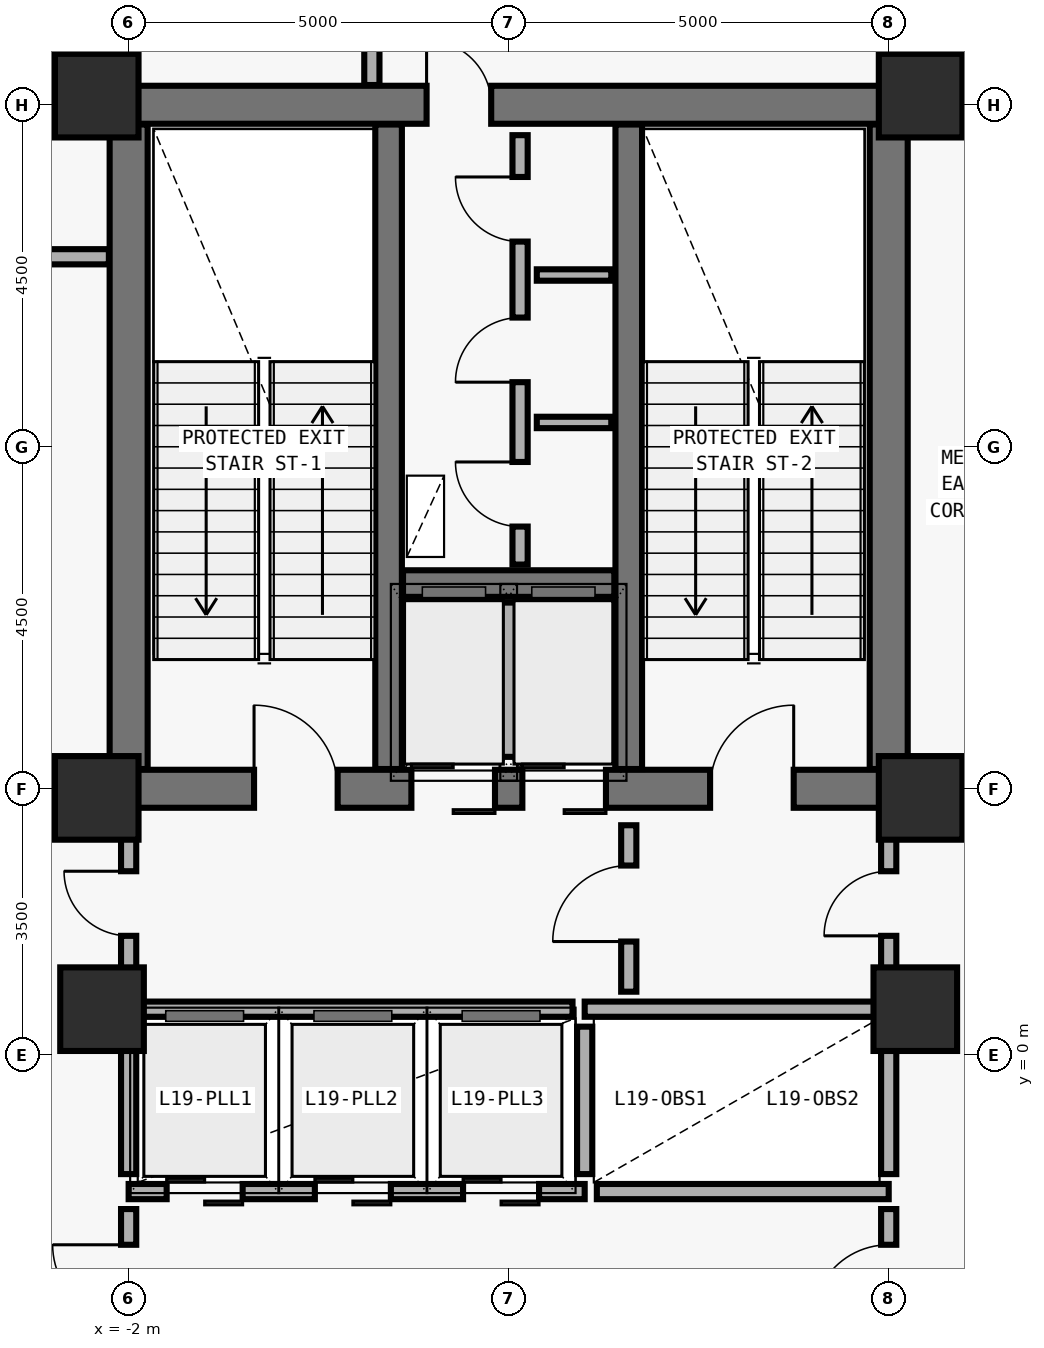
"""IFC4 building model, lengths in metres.
Left out: names, types, materials, properties, quantities, classifications, styles, units other than length and angle.
Written with IfcOpenShell. Run it as: python <this file> out.ifc"""

import sys

from ifc_helpers import new_model, si_unit, direction, frame, frame_2d, origin, origin_2d, place, context, subcontext, project, spatial, rectangle, extrude, element, fill, save


model = new_model("IFC4")
c1 = context("Model", 3, precision=1e-05, world=origin(), true_north=direction((0.0, 1.0)))
c2 = subcontext(c1, "Body", "Model", "MODEL_VIEW")
j1 = project(units=[si_unit("LENGTHUNIT", "METRE"), si_unit("PLANEANGLEUNIT", "RADIAN")], contexts=[c1])
p1 = place(None, origin())
s1 = spatial("IfcSite", under=j1, at=p1, CompositionType="ELEMENT")
p2 = place(p1, origin())
s2 = spatial("IfcBuilding", under=s1, at=p2, CompositionType="ELEMENT")
p3 = place(p2, frame((0.0, 0.0, 78.3)))
s3 = spatial("IfcBuildingStorey", under=s2, at=p3, CompositionType="ELEMENT", Elevation=78.3)
p4 = place(p3, frame((-2.0, 3.5, 0.0), z_axis=(0.0, 0.0, 1.0), x_axis=(1.0, 0.0, 0.0)))
e1 = element("IfcWall", 1, at=p4, inside=s3, PredefinedType="SHEAR", context=c2, shape_type="SweptSolid", body=[
    extrude(rectangle(XDim=10.0, YDim=0.5, at=frame_2d((5.0, 0.0))), origin(), (0.0, 0.0, 1.0), 5.392),
])
p5 = place(p4, frame((1.65, 0.0, 0.0)))
e2 = element("IfcOpeningElement", 2, at=p5, cuts=e1, PredefinedType="OPENING", context=c2, shape_type="SweptSolid", body=[
    extrude(rectangle(XDim=1.1, YDim=2.15, at=frame_2d((0.55, 1.075))), frame((0.0, 0.26, 0.0), z_axis=(0.0, -1.0, 0.0), x_axis=(1.0, 0.0, 0.0)), (0.0, 0.0, 1.0), 0.52),
])
p6 = place(p4, frame((7.65, 0.0, 0.0)))
e3 = element("IfcOpeningElement", 3, at=p6, cuts=e1, PredefinedType="OPENING", context=c2, shape_type="SweptSolid", body=[
    extrude(rectangle(XDim=1.1, YDim=2.15, at=frame_2d((0.55, 1.075))), frame((0.0, 0.26, 0.0), z_axis=(0.0, -1.0, 0.0), x_axis=(1.0, 0.0, 0.0)), (0.0, 0.0, 1.0), 0.52),
])
p7 = place(p4, frame((3.72, 0.0, 0.0)))
e4 = element("IfcOpeningElement", 4, at=p7, cuts=e1, PredefinedType="OPENING", context=c2, shape_type="SweptSolid", body=[
    extrude(rectangle(XDim=1.1, YDim=2.2, at=frame_2d((0.55, 1.1))), frame((0.0, 0.26, 0.0), z_axis=(0.0, -1.0, 0.0), x_axis=(1.0, 0.0, 0.0)), (0.0, 0.0, 1.0), 0.52),
])
p8 = place(p4, frame((5.18, 0.0, 0.0)))
e5 = element("IfcOpeningElement", 5, at=p8, cuts=e1, PredefinedType="OPENING", context=c2, shape_type="SweptSolid", body=[
    extrude(rectangle(XDim=1.1, YDim=2.2, at=frame_2d((0.55, 1.1))), frame((0.0, 0.26, 0.0), z_axis=(0.0, -1.0, 0.0), x_axis=(1.0, 0.0, 0.0)), (0.0, 0.0, 1.0), 0.52),
])
p9 = place(p3, frame((-2.0, 12.5, 0.0), z_axis=(0.0, 0.0, 1.0), x_axis=(1.0, 0.0, 0.0)))
e6 = element("IfcWall", 6, at=p9, inside=s3, PredefinedType="SHEAR", context=c2, shape_type="SweptSolid", body=[
    extrude(rectangle(XDim=10.0, YDim=0.5, at=frame_2d((5.0, 0.0))), origin(), (0.0, 0.0, 1.0), 5.392),
])
p10 = place(p9, frame((3.92, 0.0, 0.0)))
e7 = element("IfcOpeningElement", 7, at=p10, cuts=e6, PredefinedType="OPENING", context=c2, shape_type="SweptSolid", body=[
    extrude(rectangle(XDim=0.85, YDim=2.1, at=frame_2d((0.425, 1.05))), frame((0.0, 0.26, 0.0), z_axis=(0.0, -1.0, 0.0), x_axis=(1.0, 0.0, 0.0)), (0.0, 0.0, 1.0), 0.52),
])
for number, where, z_axis, x_axis in (
    (8, (-2.0, 3.76, 0.0), (0.0, 0.0, 1.0), (0.0, 1.0, 0.0)),
    (9, (8.0, 3.76, 0.0), (0.0, 0.0, 1.0), (0.0, 1.0, 0.0)),
):
    element("IfcWall", number, at=place(p3, frame(where, z_axis=z_axis, x_axis=x_axis)), inside=s3, PredefinedType="SHEAR", context=c2, shape_type="SweptSolid", body=[
        extrude(rectangle(XDim=8.48, YDim=0.5, at=frame_2d((4.24, 0.0))), origin(), (0.0, 0.0, 1.0), 5.392),
    ])
for number, where, z_axis, x_axis in (
    (10, (1.42, 3.76, 0.0), (0.0, 0.0, 1.0), (0.0, 1.0, 0.0)),
    (11, (4.58, 3.76, 0.0), (0.0, 0.0, 1.0), (0.0, 1.0, 0.0)),
):
    element("IfcWall", number, at=place(p3, frame(where, z_axis=z_axis, x_axis=x_axis)), inside=s3, PredefinedType="SHEAR", context=c2, shape_type="SweptSolid", body=[
        extrude(rectangle(XDim=8.48, YDim=0.35, at=frame_2d((4.24, 0.0))), origin(), (0.0, 0.0, 1.0), 5.392),
    ])
p11 = place(p3, frame((1.61, 6.2, 0.0), z_axis=(0.0, 0.0, 1.0), x_axis=(1.0, 0.0, 0.0)))
e12 = element("IfcWall", 12, at=p11, inside=s3, PredefinedType="SHEAR", context=c2, shape_type="SweptSolid", body=[
    extrude(rectangle(XDim=2.78, YDim=0.35, at=frame_2d((1.39, 0.0))), origin(), (0.0, 0.0, 1.0), 5.392),
])
for number, where, z_axis, x_axis in (
    (13, (-2.42, 12.62, 0.0), (0.0, 0.0, 1.0), (1.0, 0.0, 0.0)),
    (14, (8.42, 12.62, 0.0), (0.0, 0.0, 1.0), (1.0, 0.0, 0.0)),
    (15, (-2.42, 3.38, 0.0), (0.0, 0.0, 1.0), (1.0, 0.0, 0.0)),
    (16, (8.42, 3.38, 0.0), (0.0, 0.0, 1.0), (1.0, 0.0, 0.0)),
    (17, (-2.35, 0.6, 0.0), (0.0, 0.0, 1.0), (1.0, 0.0, 0.0)),
    (18, (8.35, 0.6, 0.0), (0.0, 0.0, 1.0), (1.0, 0.0, 0.0)),
):
    element("IfcColumn", number, at=place(p3, frame(where, z_axis=z_axis, x_axis=x_axis)), inside=s3, PredefinedType="COLUMN", context=c2, shape_type="SweptSolid", body=[
        extrude(rectangle(XDim=1.1, YDim=1.1, at=origin_2d()), origin(), (0.0, 0.0, 1.0), 5.375),
    ])
p12 = place(p3, frame((3.0, 3.92, 0.0), z_axis=(0.0, 0.0, 1.0), x_axis=(0.0, 1.0, 0.0)))
e19 = element("IfcWall", 19, at=p12, inside=s3, PredefinedType="SOLIDWALL", context=c2, shape_type="SweptSolid", body=[
    extrude(rectangle(XDim=2.03, YDim=0.2, at=frame_2d((1.015, 0.0))), origin(), (0.0, 0.0, 1.0), 5.14),
])
p13 = place(p3, frame((4.0, 0.6, 0.0), z_axis=(0.0, 0.0, 1.0), x_axis=(1.0, 0.0, 0.0)))
e20 = element("IfcWall", 20, at=p13, inside=s3, PredefinedType="SOLIDWALL", context=c2, shape_type="SweptSolid", body=[
    extrude(rectangle(XDim=3.88, YDim=0.2, at=frame_2d((1.94, 0.0))), origin(), (0.0, 0.0, 1.0), 4.672),
])
p14 = place(p3, frame((-2.0, -1.8, 0.0), z_axis=(0.0, 0.0, 1.0), x_axis=(1.0, 0.0, 0.0)))
e21 = element("IfcWall", 21, at=p14, inside=s3, PredefinedType="SOLIDWALL", context=c2, shape_type="SweptSolid", body=[
    extrude(rectangle(XDim=6.0, YDim=0.2, at=frame_2d((3.0, 0.0))), origin(), (0.0, 0.0, 1.0), 5.14),
])
p15 = place(p14, frame((0.5, 0.0, 0.0)))
e22 = element("IfcOpeningElement", 22, at=p15, cuts=e21, PredefinedType="OPENING", context=c2, shape_type="SweptSolid", body=[
    extrude(rectangle(XDim=1.0, YDim=2.2, at=frame_2d((0.5, 1.1))), frame((0.0, 0.11, 0.0), z_axis=(0.0, -1.0, 0.0), x_axis=(1.0, 0.0, 0.0)), (0.0, 0.0, 1.0), 0.22),
])
p16 = place(p14, frame((2.45, 0.0, 0.0)))
e23 = element("IfcOpeningElement", 23, at=p16, cuts=e21, PredefinedType="OPENING", context=c2, shape_type="SweptSolid", body=[
    extrude(rectangle(XDim=1.0, YDim=2.2, at=frame_2d((0.5, 1.1))), frame((0.0, 0.11, 0.0), z_axis=(0.0, -1.0, 0.0), x_axis=(1.0, 0.0, 0.0)), (0.0, 0.0, 1.0), 0.22),
])
p17 = place(p14, frame((4.4, 0.0, 0.0)))
e24 = element("IfcOpeningElement", 24, at=p17, cuts=e21, PredefinedType="OPENING", context=c2, shape_type="SweptSolid", body=[
    extrude(rectangle(XDim=1.0, YDim=2.2, at=frame_2d((0.5, 1.1))), frame((0.0, 0.11, 0.0), z_axis=(0.0, -1.0, 0.0), x_axis=(1.0, 0.0, 0.0)), (0.0, 0.0, 1.0), 0.22),
])
p18 = place(p3, frame((-2.0, -1.57, 0.0), z_axis=(0.0, 0.0, 1.0), x_axis=(0.0, 1.0, 0.0)))
e25 = element("IfcWall", 25, at=p18, inside=s3, PredefinedType="SOLIDWALL", context=c2, shape_type="SweptSolid", body=[
    extrude(rectangle(XDim=2.05, YDim=0.2, at=frame_2d((1.025, 0.0))), origin(), (0.0, 0.0, 1.0), 4.522),
])
p19 = place(p3, frame((4.16, -1.8, 0.0), z_axis=(0.0, 0.0, 1.0), x_axis=(1.0, 0.0, 0.0)))
e26 = element("IfcWall", 26, at=p19, inside=s3, PredefinedType="SOLIDWALL", context=c2, shape_type="SweptSolid", body=[
    extrude(rectangle(XDim=3.84, YDim=0.2, at=frame_2d((1.92, 0.0))), origin(), (0.0, 0.0, 1.0), 5.14),
])
p20 = place(p3, frame((4.0, -1.57, 0.0), z_axis=(0.0, 0.0, 1.0), x_axis=(0.0, 1.0, 0.0)))
e27 = element("IfcWall", 27, at=p20, inside=s3, PredefinedType="SOLIDWALL", context=c2, shape_type="SweptSolid", body=[
    extrude(rectangle(XDim=1.94, YDim=0.2, at=frame_2d((0.97, 0.0))), origin(), (0.0, 0.0, 1.0), 5.14),
])
p21 = place(p3, frame((8.0, -1.57, 0.0), z_axis=(0.0, 0.0, 1.0), x_axis=(0.0, 1.0, 0.0)))
e28 = element("IfcWall", 28, at=p21, inside=s3, PredefinedType="SOLIDWALL", context=c2, shape_type="SweptSolid", body=[
    extrude(rectangle(XDim=2.05, YDim=0.2, at=frame_2d((1.025, 0.0))), origin(), (0.0, 0.0, 1.0), 4.572),
])
p22 = place(p3, frame((3.15, 6.45, 0.0), z_axis=(0.0, 0.0, 1.0), x_axis=(0.0, 1.0, 0.0)))
e29 = element("IfcWall", 29, at=p22, inside=s3, PredefinedType="MOVABLE", context=c2, shape_type="SweptSolid", body=[
    extrude(rectangle(XDim=5.65, YDim=0.2, at=frame_2d((2.825, 0.0))), origin(), (0.0, 0.0, 1.0), 5.14),
])
p23 = place(p22, frame((0.5, 0.0, 0.0)))
e30 = element("IfcOpeningElement", 30, at=p23, cuts=e29, PredefinedType="OPENING", context=c2, shape_type="SweptSolid", body=[
    extrude(rectangle(XDim=0.85, YDim=2.1, at=frame_2d((0.425, 1.05))), frame((0.0, 0.11, 0.0), z_axis=(0.0, -1.0, 0.0), x_axis=(1.0, 0.0, 0.0)), (0.0, 0.0, 1.0), 0.22),
])
p24 = place(p22, frame((2.4, 0.0, 0.0)))
e31 = element("IfcOpeningElement", 31, at=p24, cuts=e29, PredefinedType="OPENING", context=c2, shape_type="SweptSolid", body=[
    extrude(rectangle(XDim=0.85, YDim=2.1, at=frame_2d((0.425, 1.05))), frame((0.0, 0.11, 0.0), z_axis=(0.0, -1.0, 0.0), x_axis=(1.0, 0.0, 0.0)), (0.0, 0.0, 1.0), 0.22),
])
p25 = place(p22, frame((4.25, 0.0, 0.0)))
e32 = element("IfcOpeningElement", 32, at=p25, cuts=e29, PredefinedType="OPENING", context=c2, shape_type="SweptSolid", body=[
    extrude(rectangle(XDim=0.85, YDim=2.1, at=frame_2d((0.425, 1.05))), frame((0.0, 0.11, 0.0), z_axis=(0.0, -1.0, 0.0), x_axis=(1.0, 0.0, 0.0)), (0.0, 0.0, 1.0), 0.22),
])
p26 = place(p3, frame((4.58, 0.83, 0.0), z_axis=(0.0, 0.0, 1.0), x_axis=(0.0, 1.0, 0.0)))
e33 = element("IfcWall", 33, at=p26, inside=s3, PredefinedType="MOVABLE", context=c2, shape_type="SweptSolid", body=[
    extrude(rectangle(XDim=2.19, YDim=0.2, at=frame_2d((1.095, 0.0))), origin(), (0.0, 0.0, 1.0), 5.14),
])
p27 = place(p26, frame((0.66, 0.0, 0.0)))
e34 = element("IfcOpeningElement", 34, at=p27, cuts=e33, PredefinedType="OPENING", context=c2, shape_type="SweptSolid", body=[
    extrude(rectangle(XDim=1.0, YDim=2.1, at=frame_2d((0.5, 1.05))), frame((0.0, 0.11, 0.0), z_axis=(0.0, -1.0, 0.0), x_axis=(1.0, 0.0, 0.0)), (0.0, 0.0, 1.0), 0.22),
])
p28 = place(p3, frame((-2.0, 0.72, 0.0), z_axis=(0.0, 0.0, 1.0), x_axis=(0.0, 1.0, 0.0)))
e35 = element("IfcWall", 35, at=p28, inside=s3, PredefinedType="MOVABLE", context=c2, shape_type="SweptSolid", body=[
    extrude(rectangle(XDim=2.3, YDim=0.2, at=frame_2d((1.15, 0.0))), origin(), (0.0, 0.0, 1.0), 4.372),
])
p29 = place(p28, frame((0.845, 0.0, 0.0)))
e36 = element("IfcOpeningElement", 36, at=p29, cuts=e35, PredefinedType="OPENING", context=c2, shape_type="SweptSolid", body=[
    extrude(rectangle(XDim=0.85, YDim=2.1, at=frame_2d((0.425, 1.05))), frame((0.0, 0.11, 0.0), z_axis=(0.0, -1.0, 0.0), x_axis=(1.0, 0.0, 0.0)), (0.0, 0.0, 1.0), 0.22),
])
p30 = place(p3, frame((8.0, 0.72, 0.0), z_axis=(0.0, 0.0, 1.0), x_axis=(0.0, 1.0, 0.0)))
e37 = element("IfcWall", 37, at=p30, inside=s3, PredefinedType="MOVABLE", context=c2, shape_type="SweptSolid", body=[
    extrude(rectangle(XDim=2.3, YDim=0.2, at=frame_2d((1.15, 0.0))), origin(), (0.0, 0.0, 1.0), 4.372),
])
p31 = place(p30, frame((0.845, 0.0, 0.0)))
e38 = element("IfcOpeningElement", 38, at=p31, cuts=e37, PredefinedType="OPENING", context=c2, shape_type="SweptSolid", body=[
    extrude(rectangle(XDim=0.85, YDim=2.1, at=frame_2d((0.425, 1.05))), frame((0.0, 0.11, 0.0), z_axis=(0.0, -1.0, 0.0), x_axis=(1.0, 0.0, 0.0)), (0.0, 0.0, 1.0), 0.22),
])
p32 = place(p3, frame((-2.0, -3.97, 0.0), z_axis=(0.0, 0.0, 1.0), x_axis=(0.0, 1.0, 0.0)))
e39 = element("IfcWall", 39, at=p32, inside=s3, PredefinedType="MOVABLE", context=c2, shape_type="SweptSolid", body=[
    extrude(rectangle(XDim=1.94, YDim=0.2, at=frame_2d((0.97, 0.0))), origin(), (0.0, 0.0, 1.0), 4.522),
])
p33 = place(p32, frame((0.47, 0.0, 0.0)))
e40 = element("IfcOpeningElement", 40, at=p33, cuts=e39, PredefinedType="OPENING", context=c2, shape_type="SweptSolid", body=[
    extrude(rectangle(XDim=1.0, YDim=2.1, at=frame_2d((0.5, 1.05))), frame((0.0, 0.11, 0.0), z_axis=(0.0, -1.0, 0.0), x_axis=(1.0, 0.0, 0.0)), (0.0, 0.0, 1.0), 0.22),
])
p34 = place(p3, frame((8.0, -3.97, 0.0), z_axis=(0.0, 0.0, 1.0), x_axis=(0.0, 1.0, 0.0)))
e41 = element("IfcWall", 41, at=p34, inside=s3, PredefinedType="MOVABLE", context=c2, shape_type="SweptSolid", body=[
    extrude(rectangle(XDim=1.94, YDim=0.2, at=frame_2d((0.97, 0.0))), origin(), (0.0, 0.0, 1.0), 4.572),
])
p35 = place(p34, frame((0.47, 0.0, 0.0)))
e42 = element("IfcOpeningElement", 42, at=p35, cuts=e41, PredefinedType="OPENING", context=c2, shape_type="SweptSolid", body=[
    extrude(rectangle(XDim=1.0, YDim=2.1, at=frame_2d((0.5, 1.05))), frame((0.0, 0.11, 0.0), z_axis=(0.0, -1.0, 0.0), x_axis=(1.0, 0.0, 0.0)), (0.0, 0.0, 1.0), 0.22),
])
for number, where, z_axis, x_axis in (
    (43, (3.37, 8.32, 0.0), (0.0, 0.0, 1.0), (1.0, 0.0, 0.0)),
    (44, (3.37, 10.26, 0.0), (0.0, 0.0, 1.0), (1.0, 0.0, 0.0)),
):
    element("IfcWall", number, at=place(p3, frame(where, z_axis=z_axis, x_axis=x_axis)), inside=s3, PredefinedType="PARTITIONING", context=c2, shape_type="SweptSolid", body=[
        extrude(rectangle(XDim=0.98, YDim=0.15, at=frame_2d((0.49, 0.0))), origin(), (0.0, 0.0, 1.0), 5.14),
    ])
p36 = place(p3, frame((-1.88, 0.6, 0.0), z_axis=(0.0, 0.0, 1.0), x_axis=(1.0, 0.0, 0.0)))
e45 = element("IfcWall", 45, at=p36, inside=s3, PredefinedType="MOVABLE", context=c2, shape_type="SweptSolid", body=[
    extrude(rectangle(XDim=5.72, YDim=0.2, at=frame_2d((2.86, 0.0))), origin(), (0.0, 0.0, 1.0), 4.672),
])
p37 = place(p3, frame((1.2, 14.59, 0.0), z_axis=(0.0, 0.0, 1.0), x_axis=(0.0, -1.0, 0.0)))
e46 = element("IfcWall", 46, at=p37, inside=s3, PredefinedType="MOVABLE", context=c2, shape_type="SweptSolid", body=[
    extrude(rectangle(XDim=1.83, YDim=0.2, at=frame_2d((0.915, 0.0))), origin(), (0.0, 0.0, 1.0), 5.14),
])
p38 = place(p3, frame((-20.109, 10.5, 0.0), z_axis=(0.0, 0.0, 1.0), x_axis=(1.0, 0.0, 0.0)))
e47 = element("IfcWall", 47, at=p38, inside=s3, PredefinedType="MOVABLE", context=c2, shape_type="SweptSolid", body=[
    extrude(rectangle(XDim=17.849, YDim=0.2, at=frame_2d((8.924, 0.0))), origin(), (0.0, 0.0, 1.0), 4.522),
])
p39 = place(p5, origin())
e48 = element("IfcDoor", 48, at=p39, inside=s3, OperationType="SINGLE_SWING_LEFT", PredefinedType="DOOR", context=c2, shape_type="SweptSolid", body=[
    extrude(rectangle(XDim=1.1, YDim=2.15, at=frame_2d((0.55, 1.075))), frame((0.0, 0.025, 0.0), z_axis=(0.0, -1.0, 0.0), x_axis=(1.0, 0.0, 0.0)), (0.0, 0.0, 1.0), 0.05),
])
fill(e2, e48)
p40 = place(p6, origin())
e49 = element("IfcDoor", 49, at=p40, inside=s3, OperationType="SINGLE_SWING_RIGHT", PredefinedType="DOOR", context=c2, shape_type="SweptSolid", body=[
    extrude(rectangle(XDim=1.1, YDim=2.15, at=frame_2d((0.55, 1.075))), frame((0.0, 0.025, 0.0), z_axis=(0.0, -1.0, 0.0), x_axis=(1.0, 0.0, 0.0)), (0.0, 0.0, 1.0), 0.05),
])
fill(e3, e49)
p41 = place(p7, origin())
e50 = element("IfcDoor", 50, at=p41, inside=s3, OperationType="DOUBLE_DOOR_SLIDING", PredefinedType="DOOR", context=c2, shape_type="SweptSolid", body=[
    extrude(rectangle(XDim=1.1, YDim=2.2, at=frame_2d((0.55, 1.1))), frame((0.0, 0.025, 0.0), z_axis=(0.0, -1.0, 0.0), x_axis=(1.0, 0.0, 0.0)), (0.0, 0.0, 1.0), 0.05),
])
fill(e4, e50)
p42 = place(p8, origin())
e51 = element("IfcDoor", 51, at=p42, inside=s3, OperationType="DOUBLE_DOOR_SLIDING", PredefinedType="DOOR", context=c2, shape_type="SweptSolid", body=[
    extrude(rectangle(XDim=1.1, YDim=2.2, at=frame_2d((0.55, 1.1))), frame((0.0, 0.025, 0.0), z_axis=(0.0, -1.0, 0.0), x_axis=(1.0, 0.0, 0.0)), (0.0, 0.0, 1.0), 0.05),
])
fill(e5, e51)
p43 = place(p10, origin())
e52 = element("IfcDoor", 52, at=p43, inside=s3, OperationType="SINGLE_SWING_LEFT", PredefinedType="DOOR", context=c2, shape_type="SweptSolid", body=[
    extrude(rectangle(XDim=0.85, YDim=2.1, at=frame_2d((0.425, 1.05))), frame((0.0, 0.025, 0.0), z_axis=(0.0, -1.0, 0.0), x_axis=(1.0, 0.0, 0.0)), (0.0, 0.0, 1.0), 0.05),
])
fill(e7, e52)
p44 = place(p23, origin())
e53 = element("IfcDoor", 53, at=p44, inside=s3, OperationType="SINGLE_SWING_RIGHT", PredefinedType="DOOR", context=c2, shape_type="SweptSolid", body=[
    extrude(rectangle(XDim=0.85, YDim=2.1, at=frame_2d((0.425, 1.05))), frame((0.0, 0.025, 0.0), z_axis=(0.0, -1.0, 0.0), x_axis=(1.0, 0.0, 0.0)), (0.0, 0.0, 1.0), 0.05),
])
fill(e30, e53)
p45 = place(p24, origin())
e54 = element("IfcDoor", 54, at=p45, inside=s3, OperationType="SINGLE_SWING_LEFT", PredefinedType="DOOR", context=c2, shape_type="SweptSolid", body=[
    extrude(rectangle(XDim=0.85, YDim=2.1, at=frame_2d((0.425, 1.05))), frame((0.0, 0.025, 0.0), z_axis=(0.0, -1.0, 0.0), x_axis=(1.0, 0.0, 0.0)), (0.0, 0.0, 1.0), 0.05),
])
fill(e31, e54)
p46 = place(p25, origin())
e55 = element("IfcDoor", 55, at=p46, inside=s3, OperationType="SINGLE_SWING_RIGHT", PredefinedType="DOOR", context=c2, shape_type="SweptSolid", body=[
    extrude(rectangle(XDim=0.85, YDim=2.1, at=frame_2d((0.425, 1.05))), frame((0.0, 0.025, 0.0), z_axis=(0.0, -1.0, 0.0), x_axis=(1.0, 0.0, 0.0)), (0.0, 0.0, 1.0), 0.05),
])
fill(e32, e55)
p47 = place(p27, origin())
e56 = element("IfcDoor", 56, at=p47, inside=s3, OperationType="SINGLE_SWING_LEFT", PredefinedType="DOOR", context=c2, shape_type="SweptSolid", body=[
    extrude(rectangle(XDim=1.0, YDim=2.1, at=frame_2d((0.5, 1.05))), frame((0.0, 0.025, 0.0), z_axis=(0.0, -1.0, 0.0), x_axis=(1.0, 0.0, 0.0)), (0.0, 0.0, 1.0), 0.05),
])
fill(e34, e56)
p48 = place(p29, origin())
e57 = element("IfcDoor", 57, at=p48, inside=s3, OperationType="SINGLE_SWING_RIGHT", PredefinedType="DOOR", context=c2, shape_type="SweptSolid", body=[
    extrude(rectangle(XDim=0.85, YDim=2.1, at=frame_2d((0.425, 1.05))), frame((0.0, 0.025, 0.0), z_axis=(0.0, -1.0, 0.0), x_axis=(1.0, 0.0, 0.0)), (0.0, 0.0, 1.0), 0.05),
])
fill(e36, e57)
p49 = place(p31, origin())
e58 = element("IfcDoor", 58, at=p49, inside=s3, OperationType="SINGLE_SWING_LEFT", PredefinedType="DOOR", context=c2, shape_type="SweptSolid", body=[
    extrude(rectangle(XDim=0.85, YDim=2.1, at=frame_2d((0.425, 1.05))), frame((0.0, 0.025, 0.0), z_axis=(0.0, -1.0, 0.0), x_axis=(1.0, 0.0, 0.0)), (0.0, 0.0, 1.0), 0.05),
])
fill(e38, e58)
p50 = place(p33, origin())
e59 = element("IfcDoor", 59, at=p50, inside=s3, OperationType="SINGLE_SWING_RIGHT", PredefinedType="DOOR", context=c2, shape_type="SweptSolid", body=[
    extrude(rectangle(XDim=1.0, YDim=2.1, at=frame_2d((0.5, 1.05))), frame((0.0, 0.025, 0.0), z_axis=(0.0, -1.0, 0.0), x_axis=(1.0, 0.0, 0.0)), (0.0, 0.0, 1.0), 0.05),
])
fill(e40, e59)
p51 = place(p35, origin())
e60 = element("IfcDoor", 60, at=p51, inside=s3, OperationType="SINGLE_SWING_LEFT", PredefinedType="DOOR", context=c2, shape_type="SweptSolid", body=[
    extrude(rectangle(XDim=1.0, YDim=2.1, at=frame_2d((0.5, 1.05))), frame((0.0, 0.025, 0.0), z_axis=(0.0, -1.0, 0.0), x_axis=(1.0, 0.0, 0.0)), (0.0, 0.0, 1.0), 0.05),
])
fill(e42, e60)
p52 = place(p15, origin())
e61 = element("IfcDoor", 61, at=p52, inside=s3, OperationType="DOUBLE_DOOR_SLIDING", PredefinedType="DOOR", context=c2, shape_type="SweptSolid", body=[
    extrude(rectangle(XDim=1.0, YDim=2.2, at=frame_2d((0.5, 1.1))), frame((0.0, 0.025, 0.0), z_axis=(0.0, -1.0, 0.0), x_axis=(1.0, 0.0, 0.0)), (0.0, 0.0, 1.0), 0.05),
])
fill(e22, e61)
p53 = place(p16, origin())
e62 = element("IfcDoor", 62, at=p53, inside=s3, OperationType="DOUBLE_DOOR_SLIDING", PredefinedType="DOOR", context=c2, shape_type="SweptSolid", body=[
    extrude(rectangle(XDim=1.0, YDim=2.2, at=frame_2d((0.5, 1.1))), frame((0.0, 0.025, 0.0), z_axis=(0.0, -1.0, 0.0), x_axis=(1.0, 0.0, 0.0)), (0.0, 0.0, 1.0), 0.05),
])
fill(e23, e62)
p54 = place(p17, origin())
e63 = element("IfcDoor", 63, at=p54, inside=s3, OperationType="DOUBLE_DOOR_SLIDING", PredefinedType="DOOR", context=c2, shape_type="SweptSolid", body=[
    extrude(rectangle(XDim=1.0, YDim=2.2, at=frame_2d((0.5, 1.1))), frame((0.0, 0.025, 0.0), z_axis=(0.0, -1.0, 0.0), x_axis=(1.0, 0.0, 0.0)), (0.0, 0.0, 1.0), 0.05),
])
fill(e24, e63)
save(model, sys.argv[1])
